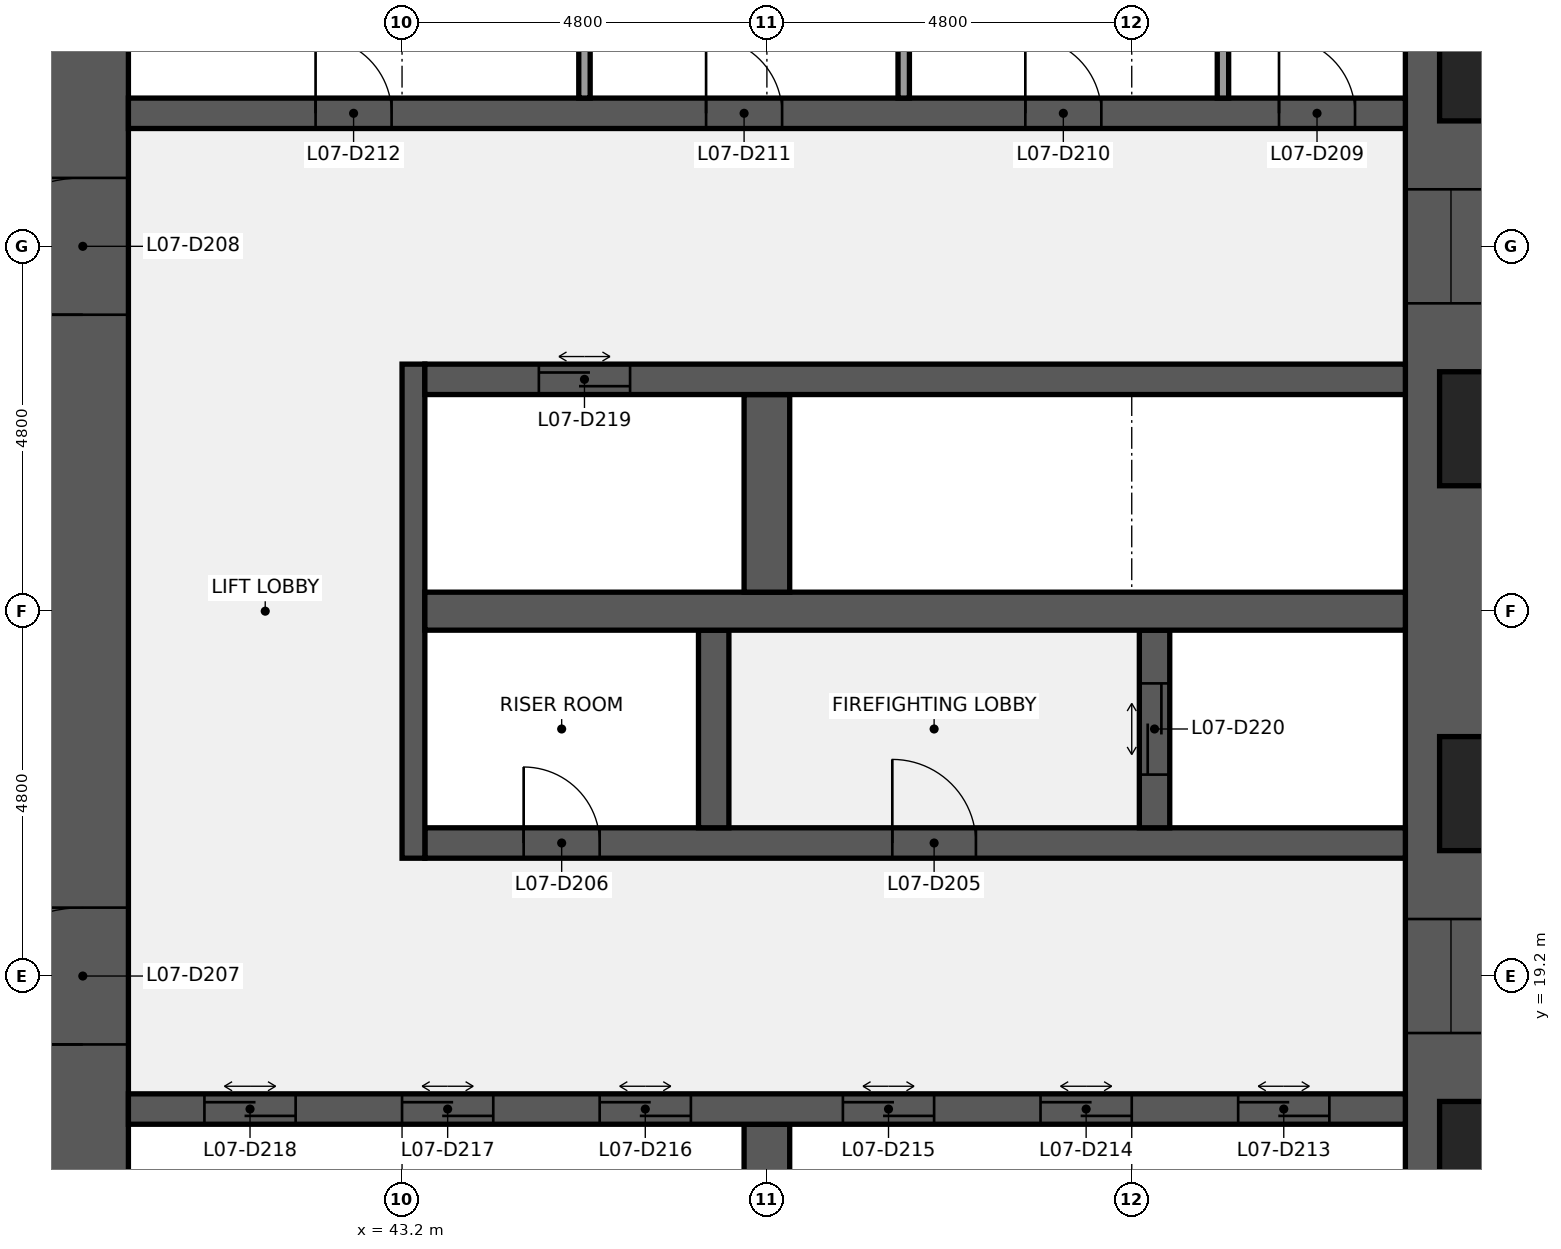
"""IFC4 building model, lengths in metres.
Left out: names, types, materials, properties, quantities, classifications, styles, units other than length and angle.
Written with IfcOpenShell. Run it as: python <this file> out.ifc"""

import sys

from ifc_helpers import new_model, si_unit, direction, frame, frame_2d, origin, place, context, subcontext, project, spatial, rectangle, extrude, element, fill, save


model = new_model("IFC4")
c1 = context("Model", 3, precision=1e-05, world=origin(), true_north=direction((0.0, 1.0)))
c2 = subcontext(c1, "Body", "Model", "MODEL_VIEW")
j1 = project(units=[si_unit("LENGTHUNIT", "METRE"), si_unit("PLANEANGLEUNIT", "RADIAN")], contexts=[c1])
p1 = place(None, origin())
s1 = spatial("IfcSite", under=j1, at=p1, CompositionType="ELEMENT")
p2 = place(p1, origin())
s2 = spatial("IfcBuilding", under=s1, at=p2, CompositionType="ELEMENT")
p3 = place(p2, frame((0.0, 0.0, 39.0)))
s3 = spatial("IfcBuildingStorey", under=s2, at=p3, CompositionType="ELEMENT", Elevation=39.0)
p4 = place(p3, frame((57.0, 38.4, 0.0), z_axis=(0.0, 0.0, 1.0), x_axis=(0.0, -1.0, 0.0)))
e1 = element("IfcWall", 1, at=p4, inside=s3, PredefinedType="SHEAR", context=c2, shape_type="SweptSolid", body=[
    extrude(rectangle(XDim=28.8, YDim=1.2, at=frame_2d((14.4, 0.0))), origin(), (0.0, 0.0, 1.0), 3.84),
])
p5 = place(p4, frame((18.45, 0.0, 0.9)))
e2 = element("IfcOpeningElement", 2, at=p5, cuts=e1, PredefinedType="OPENING", context=c2, shape_type="SweptSolid", body=[
    extrude(rectangle(XDim=1.5, YDim=1.5, at=frame_2d((0.75, 0.75))), frame((0.0, 0.61, 0.0), z_axis=(0.0, -1.0, 0.0), x_axis=(1.0, 0.0, 0.0)), (0.0, 0.0, 1.0), 1.22),
])
p6 = place(p4, frame((8.85, 0.0, 0.9)))
e3 = element("IfcOpeningElement", 3, at=p6, cuts=e1, PredefinedType="OPENING", context=c2, shape_type="SweptSolid", body=[
    extrude(rectangle(XDim=1.5, YDim=1.5, at=frame_2d((0.75, 0.75))), frame((0.0, 0.61, 0.0), z_axis=(0.0, -1.0, 0.0), x_axis=(1.0, 0.0, 0.0)), (0.0, 0.0, 1.0), 1.22),
])
p7 = place(p3, frame((39.0, 9.6, 0.0), z_axis=(0.0, 0.0, 1.0), x_axis=(0.0, 1.0, 0.0)))
e4 = element("IfcWall", 4, at=p7, inside=s3, PredefinedType="SHEAR", context=c2, shape_type="SweptSolid", body=[
    extrude(rectangle(XDim=28.8, YDim=1.2, at=frame_2d((14.4, 0.0))), origin(), (0.0, 0.0, 1.0), 3.84),
])
p8 = place(p7, frame((8.7, 0.0, 0.0)))
e5 = element("IfcOpeningElement", 5, at=p8, cuts=e4, PredefinedType="OPENING", context=c2, shape_type="SweptSolid", body=[
    extrude(rectangle(XDim=1.8, YDim=2.1, at=frame_2d((0.9, 1.05))), frame((0.0, 0.61, 0.0), z_axis=(0.0, -1.0, 0.0), x_axis=(1.0, 0.0, 0.0)), (0.0, 0.0, 1.0), 1.22),
])
p9 = place(p7, frame((18.3, 0.0, 0.0)))
e6 = element("IfcOpeningElement", 6, at=p9, cuts=e4, PredefinedType="OPENING", context=c2, shape_type="SweptSolid", body=[
    extrude(rectangle(XDim=1.8, YDim=2.1, at=frame_2d((0.9, 1.05))), frame((0.0, 0.61, 0.0), z_axis=(0.0, -1.0, 0.0), x_axis=(1.0, 0.0, 0.0)), (0.0, 0.0, 1.0), 1.22),
])
p10 = place(p3, frame((48.0, 14.65, 0.0), z_axis=(0.0, 0.0, 1.0), x_axis=(0.0, 1.0, 0.0)))
e7 = element("IfcWall", 7, at=p10, inside=s3, PredefinedType="SHEAR", context=c2, shape_type="SweptSolid", body=[
    extrude(rectangle(XDim=2.6, YDim=0.6, at=frame_2d((1.3, 0.0))), origin(), (0.0, 0.0, 1.0), 3.84),
])
p11 = place(p3, frame((39.6, 17.45, 0.0), z_axis=(0.0, 0.0, 1.0), x_axis=(1.0, 0.0, 0.0)))
e8 = element("IfcWall", 8, at=p11, inside=s3, PredefinedType="SHEAR", context=c2, shape_type="SweptSolid", body=[
    extrude(rectangle(XDim=16.8, YDim=0.4, at=frame_2d((8.4, 0.0))), origin(), (0.0, 0.0, 1.0), 3.84),
])
p12 = place(p11, frame((14.6, 0.0, 0.0)))
e9 = element("IfcOpeningElement", 9, at=p12, cuts=e8, PredefinedType="OPENING", context=c2, shape_type="SweptSolid", body=[
    extrude(rectangle(XDim=1.2, YDim=2.1, at=frame_2d((0.6, 1.05))), frame((0.0, 0.21, 0.0), z_axis=(0.0, -1.0, 0.0), x_axis=(1.0, 0.0, 0.0)), (0.0, 0.0, 1.0), 0.42),
])
p13 = place(p11, frame((12.0, 0.0, 0.0)))
e10 = element("IfcOpeningElement", 10, at=p13, cuts=e8, PredefinedType="OPENING", context=c2, shape_type="SweptSolid", body=[
    extrude(rectangle(XDim=1.2, YDim=2.1, at=frame_2d((0.6, 1.05))), frame((0.0, 0.21, 0.0), z_axis=(0.0, -1.0, 0.0), x_axis=(1.0, 0.0, 0.0)), (0.0, 0.0, 1.0), 0.42),
])
p14 = place(p11, frame((9.4, 0.0, 0.0)))
e11 = element("IfcOpeningElement", 11, at=p14, cuts=e8, PredefinedType="OPENING", context=c2, shape_type="SweptSolid", body=[
    extrude(rectangle(XDim=1.2, YDim=2.1, at=frame_2d((0.6, 1.05))), frame((0.0, 0.21, 0.0), z_axis=(0.0, -1.0, 0.0), x_axis=(1.0, 0.0, 0.0)), (0.0, 0.0, 1.0), 0.42),
])
p15 = place(p11, frame((6.2, 0.0, 0.0)))
e12 = element("IfcOpeningElement", 12, at=p15, cuts=e8, PredefinedType="OPENING", context=c2, shape_type="SweptSolid", body=[
    extrude(rectangle(XDim=1.2, YDim=2.1, at=frame_2d((0.6, 1.05))), frame((0.0, 0.21, 0.0), z_axis=(0.0, -1.0, 0.0), x_axis=(1.0, 0.0, 0.0)), (0.0, 0.0, 1.0), 0.42),
])
p16 = place(p11, frame((3.6, 0.0, 0.0)))
e13 = element("IfcOpeningElement", 13, at=p16, cuts=e8, PredefinedType="OPENING", context=c2, shape_type="SweptSolid", body=[
    extrude(rectangle(XDim=1.2, YDim=2.1, at=frame_2d((0.6, 1.05))), frame((0.0, 0.21, 0.0), z_axis=(0.0, -1.0, 0.0), x_axis=(1.0, 0.0, 0.0)), (0.0, 0.0, 1.0), 0.42),
])
p17 = place(p11, frame((1.0, 0.0, 0.0)))
e14 = element("IfcOpeningElement", 14, at=p17, cuts=e8, PredefinedType="OPENING", context=c2, shape_type="SweptSolid", body=[
    extrude(rectangle(XDim=1.2, YDim=2.1, at=frame_2d((0.6, 1.05))), frame((0.0, 0.21, 0.0), z_axis=(0.0, -1.0, 0.0), x_axis=(1.0, 0.0, 0.0)), (0.0, 0.0, 1.0), 0.42),
])
p18 = place(p3, frame((43.5, 20.95, 0.0), z_axis=(0.0, 0.0, 1.0), x_axis=(1.0, 0.0, 0.0)))
e15 = element("IfcWall", 15, at=p18, inside=s3, PredefinedType="SHEAR", context=c2, shape_type="SweptSolid", body=[
    extrude(rectangle(XDim=12.9, YDim=0.4, at=frame_2d((6.45, 0.0))), origin(), (0.0, 0.0, 1.0), 3.84),
])
p19 = place(p18, frame((6.15, 0.0, 0.0)))
e16 = element("IfcOpeningElement", 16, at=p19, cuts=e15, PredefinedType="OPENING", context=c2, shape_type="SweptSolid", body=[
    extrude(rectangle(XDim=1.1, YDim=2.1, at=frame_2d((0.55, 1.05))), frame((0.0, 0.21, 0.0), z_axis=(0.0, -1.0, 0.0), x_axis=(1.0, 0.0, 0.0)), (0.0, 0.0, 1.0), 0.42),
])
p20 = place(p18, frame((1.3, 0.0, 0.0)))
e17 = element("IfcOpeningElement", 17, at=p20, cuts=e15, PredefinedType="OPENING", context=c2, shape_type="SweptSolid", body=[
    extrude(rectangle(XDim=1.0, YDim=2.1, at=frame_2d((0.5, 1.05))), frame((0.0, 0.21, 0.0), z_axis=(0.0, -1.0, 0.0), x_axis=(1.0, 0.0, 0.0)), (0.0, 0.0, 1.0), 0.42),
])
p21 = place(p3, frame((43.35, 20.75, 0.0), z_axis=(0.0, 0.0, 1.0), x_axis=(0.0, 1.0, 0.0)))
e18 = element("IfcWall", 18, at=p21, inside=s3, PredefinedType="SHEAR", context=c2, shape_type="SweptSolid", body=[
    extrude(rectangle(XDim=6.5, YDim=0.3, at=frame_2d((3.25, 0.0))), origin(), (0.0, 0.0, 1.0), 3.84),
])
p22 = place(p3, frame((53.1, 21.15, 0.0), z_axis=(0.0, 0.0, 1.0), x_axis=(0.0, 1.0, 0.0)))
e19 = element("IfcWall", 19, at=p22, inside=s3, PredefinedType="SHEAR", context=c2, shape_type="SweptSolid", body=[
    extrude(rectangle(XDim=2.6, YDim=0.4, at=frame_2d((1.3, 0.0))), origin(), (0.0, 0.0, 1.0), 3.84),
])
p23 = place(p22, frame((0.7, 0.0, 0.0)))
e20 = element("IfcOpeningElement", 20, at=p23, cuts=e19, PredefinedType="OPENING", context=c2, shape_type="SweptSolid", body=[
    extrude(rectangle(XDim=1.2, YDim=2.1, at=frame_2d((0.6, 1.05))), frame((0.0, 0.21, 0.0), z_axis=(0.0, -1.0, 0.0), x_axis=(1.0, 0.0, 0.0)), (0.0, 0.0, 1.0), 0.42),
])
p24 = place(p3, frame((47.3, 21.15, 0.0), z_axis=(0.0, 0.0, 1.0), x_axis=(0.0, 1.0, 0.0)))
e21 = element("IfcWall", 21, at=p24, inside=s3, PredefinedType="SHEAR", context=c2, shape_type="SweptSolid", body=[
    extrude(rectangle(XDim=2.6, YDim=0.4, at=frame_2d((1.3, 0.0))), origin(), (0.0, 0.0, 1.0), 3.84),
])
p25 = place(p3, frame((43.5, 24.0, 0.0), z_axis=(0.0, 0.0, 1.0), x_axis=(1.0, 0.0, 0.0)))
e22 = element("IfcWall", 22, at=p25, inside=s3, PredefinedType="SHEAR", context=c2, shape_type="SweptSolid", body=[
    extrude(rectangle(XDim=12.9, YDim=0.5, at=frame_2d((6.45, 0.0))), origin(), (0.0, 0.0, 1.0), 3.84),
])
p26 = place(p3, frame((48.0, 24.25, 0.0), z_axis=(0.0, 0.0, 1.0), x_axis=(0.0, 1.0, 0.0)))
e23 = element("IfcWall", 23, at=p26, inside=s3, PredefinedType="SHEAR", context=c2, shape_type="SweptSolid", body=[
    extrude(rectangle(XDim=2.6, YDim=0.6, at=frame_2d((1.3, 0.0))), origin(), (0.0, 0.0, 1.0), 3.84),
])
p27 = place(p3, frame((43.5, 27.05, 0.0), z_axis=(0.0, 0.0, 1.0), x_axis=(1.0, 0.0, 0.0)))
e24 = element("IfcWall", 24, at=p27, inside=s3, PredefinedType="SHEAR", context=c2, shape_type="SweptSolid", body=[
    extrude(rectangle(XDim=12.9, YDim=0.4, at=frame_2d((6.45, 0.0))), origin(), (0.0, 0.0, 1.0), 3.84),
])
p28 = place(p27, frame((1.5, 0.0, 0.0)))
e25 = element("IfcOpeningElement", 25, at=p28, cuts=e24, PredefinedType="OPENING", context=c2, shape_type="SweptSolid", body=[
    extrude(rectangle(XDim=1.2, YDim=2.1, at=frame_2d((0.6, 1.05))), frame((0.0, 0.21, 0.0), z_axis=(0.0, -1.0, 0.0), x_axis=(1.0, 0.0, 0.0)), (0.0, 0.0, 1.0), 0.42),
])
p29 = place(p3, frame((39.6, 30.55, 0.0), z_axis=(0.0, 0.0, 1.0), x_axis=(1.0, 0.0, 0.0)))
e26 = element("IfcWall", 26, at=p29, inside=s3, PredefinedType="SHEAR", context=c2, shape_type="SweptSolid", body=[
    extrude(rectangle(XDim=16.8, YDim=0.4, at=frame_2d((8.4, 0.0))), origin(), (0.0, 0.0, 1.0), 3.84),
])
p30 = place(p29, frame((15.137, 0.0, 0.0)))
e27 = element("IfcOpeningElement", 27, at=p30, cuts=e26, PredefinedType="OPENING", context=c2, shape_type="SweptSolid", body=[
    extrude(rectangle(XDim=1.0, YDim=2.1, at=frame_2d((0.5, 1.05))), frame((0.0, 0.21, 0.0), z_axis=(0.0, -1.0, 0.0), x_axis=(1.0, 0.0, 0.0)), (0.0, 0.0, 1.0), 0.42),
])
p31 = place(p29, frame((11.8, 0.0, 0.0)))
e28 = element("IfcOpeningElement", 28, at=p31, cuts=e26, PredefinedType="OPENING", context=c2, shape_type="SweptSolid", body=[
    extrude(rectangle(XDim=1.0, YDim=2.1, at=frame_2d((0.5, 1.05))), frame((0.0, 0.21, 0.0), z_axis=(0.0, -1.0, 0.0), x_axis=(1.0, 0.0, 0.0)), (0.0, 0.0, 1.0), 0.42),
])
p32 = place(p29, frame((7.6, 0.0, 0.0)))
e29 = element("IfcOpeningElement", 29, at=p32, cuts=e26, PredefinedType="OPENING", context=c2, shape_type="SweptSolid", body=[
    extrude(rectangle(XDim=1.0, YDim=2.1, at=frame_2d((0.5, 1.05))), frame((0.0, 0.21, 0.0), z_axis=(0.0, -1.0, 0.0), x_axis=(1.0, 0.0, 0.0)), (0.0, 0.0, 1.0), 0.42),
])
p33 = place(p29, frame((2.462, 0.0, 0.0)))
e30 = element("IfcOpeningElement", 30, at=p33, cuts=e26, PredefinedType="OPENING", context=c2, shape_type="SweptSolid", body=[
    extrude(rectangle(XDim=1.0, YDim=2.1, at=frame_2d((0.5, 1.05))), frame((0.0, 0.21, 0.0), z_axis=(0.0, -1.0, 0.0), x_axis=(1.0, 0.0, 0.0)), (0.0, 0.0, 1.0), 0.42),
])
for number, where, z_axis, x_axis in (
    (31, (54.0, 30.75, 0.0), (0.0, 0.0, 1.0), (0.0, 1.0, 0.0)),
    (32, (49.8, 30.75, 0.0), (0.0, 0.0, 1.0), (0.0, 1.0, 0.0)),
    (33, (45.6, 30.75, 0.0), (0.0, 0.0, 1.0), (0.0, 1.0, 0.0)),
):
    element("IfcWall", number, at=place(p3, frame(where, z_axis=z_axis, x_axis=x_axis)), inside=s3, PredefinedType="PARTITIONING", context=c2, shape_type="SweptSolid", body=[
        extrude(rectangle(XDim=2.6, YDim=0.15, at=frame_2d((1.3, 0.0))), origin(), (0.0, 0.0, 1.0), 3.84),
    ])
p34 = place(p19, origin())
e34 = element("IfcDoor", 34, at=p34, inside=s3, OperationType="SINGLE_SWING_LEFT", PredefinedType="DOOR", context=c2, shape_type="SweptSolid", body=[
    extrude(rectangle(XDim=1.1, YDim=2.1, at=frame_2d((0.55, 1.05))), frame((0.0, 0.025, 0.0), z_axis=(0.0, -1.0, 0.0), x_axis=(1.0, 0.0, 0.0)), (0.0, 0.0, 1.0), 0.05),
])
fill(e16, e34)
p35 = place(p20, origin())
e35 = element("IfcDoor", 35, at=p35, inside=s3, OperationType="SINGLE_SWING_LEFT", PredefinedType="DOOR", context=c2, shape_type="SweptSolid", body=[
    extrude(rectangle(XDim=1.0, YDim=2.1, at=frame_2d((0.5, 1.05))), frame((0.0, 0.025, 0.0), z_axis=(0.0, -1.0, 0.0), x_axis=(1.0, 0.0, 0.0)), (0.0, 0.0, 1.0), 0.05),
])
fill(e17, e35)
p36 = place(p8, origin())
e36 = element("IfcDoor", 36, at=p36, inside=s3, OperationType="DOUBLE_DOOR_SINGLE_SWING", PredefinedType="DOOR", context=c2, shape_type="SweptSolid", body=[
    extrude(rectangle(XDim=1.8, YDim=2.1, at=frame_2d((0.9, 1.05))), frame((0.0, 0.025, 0.0), z_axis=(0.0, -1.0, 0.0), x_axis=(1.0, 0.0, 0.0)), (0.0, 0.0, 1.0), 0.05),
])
fill(e5, e36)
p37 = place(p9, origin())
e37 = element("IfcDoor", 37, at=p37, inside=s3, OperationType="DOUBLE_DOOR_SINGLE_SWING", PredefinedType="DOOR", context=c2, shape_type="SweptSolid", body=[
    extrude(rectangle(XDim=1.8, YDim=2.1, at=frame_2d((0.9, 1.05))), frame((0.0, 0.025, 0.0), z_axis=(0.0, -1.0, 0.0), x_axis=(1.0, 0.0, 0.0)), (0.0, 0.0, 1.0), 0.05),
])
fill(e6, e37)
p38 = place(p30, origin())
e38 = element("IfcDoor", 38, at=p38, inside=s3, OperationType="SINGLE_SWING_LEFT", PredefinedType="DOOR", context=c2, shape_type="SweptSolid", body=[
    extrude(rectangle(XDim=1.0, YDim=2.1, at=frame_2d((0.5, 1.05))), frame((0.0, 0.025, 0.0), z_axis=(0.0, -1.0, 0.0), x_axis=(1.0, 0.0, 0.0)), (0.0, 0.0, 1.0), 0.05),
])
fill(e27, e38)
p39 = place(p31, origin())
e39 = element("IfcDoor", 39, at=p39, inside=s3, OperationType="SINGLE_SWING_LEFT", PredefinedType="DOOR", context=c2, shape_type="SweptSolid", body=[
    extrude(rectangle(XDim=1.0, YDim=2.1, at=frame_2d((0.5, 1.05))), frame((0.0, 0.025, 0.0), z_axis=(0.0, -1.0, 0.0), x_axis=(1.0, 0.0, 0.0)), (0.0, 0.0, 1.0), 0.05),
])
fill(e28, e39)
p40 = place(p32, origin())
e40 = element("IfcDoor", 40, at=p40, inside=s3, OperationType="SINGLE_SWING_LEFT", PredefinedType="DOOR", context=c2, shape_type="SweptSolid", body=[
    extrude(rectangle(XDim=1.0, YDim=2.1, at=frame_2d((0.5, 1.05))), frame((0.0, 0.025, 0.0), z_axis=(0.0, -1.0, 0.0), x_axis=(1.0, 0.0, 0.0)), (0.0, 0.0, 1.0), 0.05),
])
fill(e29, e40)
p41 = place(p33, origin())
e41 = element("IfcDoor", 41, at=p41, inside=s3, OperationType="SINGLE_SWING_LEFT", PredefinedType="DOOR", context=c2, shape_type="SweptSolid", body=[
    extrude(rectangle(XDim=1.0, YDim=2.1, at=frame_2d((0.5, 1.05))), frame((0.0, 0.025, 0.0), z_axis=(0.0, -1.0, 0.0), x_axis=(1.0, 0.0, 0.0)), (0.0, 0.0, 1.0), 0.05),
])
fill(e30, e41)
p42 = place(p12, origin())
e42 = element("IfcDoor", 42, at=p42, inside=s3, OperationType="DOUBLE_DOOR_SLIDING", PredefinedType="DOOR", context=c2, shape_type="SweptSolid", body=[
    extrude(rectangle(XDim=1.2, YDim=2.1, at=frame_2d((0.6, 1.05))), frame((0.0, 0.025, 0.0), z_axis=(0.0, -1.0, 0.0), x_axis=(1.0, 0.0, 0.0)), (0.0, 0.0, 1.0), 0.05),
])
fill(e9, e42)
p43 = place(p13, origin())
e43 = element("IfcDoor", 43, at=p43, inside=s3, OperationType="DOUBLE_DOOR_SLIDING", PredefinedType="DOOR", context=c2, shape_type="SweptSolid", body=[
    extrude(rectangle(XDim=1.2, YDim=2.1, at=frame_2d((0.6, 1.05))), frame((0.0, 0.025, 0.0), z_axis=(0.0, -1.0, 0.0), x_axis=(1.0, 0.0, 0.0)), (0.0, 0.0, 1.0), 0.05),
])
fill(e10, e43)
p44 = place(p14, origin())
e44 = element("IfcDoor", 44, at=p44, inside=s3, OperationType="DOUBLE_DOOR_SLIDING", PredefinedType="DOOR", context=c2, shape_type="SweptSolid", body=[
    extrude(rectangle(XDim=1.2, YDim=2.1, at=frame_2d((0.6, 1.05))), frame((0.0, 0.025, 0.0), z_axis=(0.0, -1.0, 0.0), x_axis=(1.0, 0.0, 0.0)), (0.0, 0.0, 1.0), 0.05),
])
fill(e11, e44)
p45 = place(p15, origin())
e45 = element("IfcDoor", 45, at=p45, inside=s3, OperationType="DOUBLE_DOOR_SLIDING", PredefinedType="DOOR", context=c2, shape_type="SweptSolid", body=[
    extrude(rectangle(XDim=1.2, YDim=2.1, at=frame_2d((0.6, 1.05))), frame((0.0, 0.025, 0.0), z_axis=(0.0, -1.0, 0.0), x_axis=(1.0, 0.0, 0.0)), (0.0, 0.0, 1.0), 0.05),
])
fill(e12, e45)
p46 = place(p16, origin())
e46 = element("IfcDoor", 46, at=p46, inside=s3, OperationType="DOUBLE_DOOR_SLIDING", PredefinedType="DOOR", context=c2, shape_type="SweptSolid", body=[
    extrude(rectangle(XDim=1.2, YDim=2.1, at=frame_2d((0.6, 1.05))), frame((0.0, 0.025, 0.0), z_axis=(0.0, -1.0, 0.0), x_axis=(1.0, 0.0, 0.0)), (0.0, 0.0, 1.0), 0.05),
])
fill(e13, e46)
p47 = place(p17, origin())
e47 = element("IfcDoor", 47, at=p47, inside=s3, OperationType="DOUBLE_DOOR_SLIDING", PredefinedType="DOOR", context=c2, shape_type="SweptSolid", body=[
    extrude(rectangle(XDim=1.2, YDim=2.1, at=frame_2d((0.6, 1.05))), frame((0.0, 0.025, 0.0), z_axis=(0.0, -1.0, 0.0), x_axis=(1.0, 0.0, 0.0)), (0.0, 0.0, 1.0), 0.05),
])
fill(e14, e47)
p48 = place(p28, origin())
e48 = element("IfcDoor", 48, at=p48, inside=s3, OperationType="DOUBLE_DOOR_SLIDING", PredefinedType="DOOR", context=c2, shape_type="SweptSolid", body=[
    extrude(rectangle(XDim=1.2, YDim=2.1, at=frame_2d((0.6, 1.05))), frame((0.0, 0.025, 0.0), z_axis=(0.0, -1.0, 0.0), x_axis=(1.0, 0.0, 0.0)), (0.0, 0.0, 1.0), 0.05),
])
fill(e25, e48)
p49 = place(p23, origin())
e49 = element("IfcDoor", 49, at=p49, inside=s3, OperationType="DOUBLE_DOOR_SLIDING", PredefinedType="DOOR", context=c2, shape_type="SweptSolid", body=[
    extrude(rectangle(XDim=1.2, YDim=2.1, at=frame_2d((0.6, 1.05))), frame((0.0, 0.025, 0.0), z_axis=(0.0, -1.0, 0.0), x_axis=(1.0, 0.0, 0.0)), (0.0, 0.0, 1.0), 0.05),
])
fill(e20, e49)
p50 = place(p5, origin())
e50 = element("IfcWindow", 50, at=p50, inside=s3, PartitioningType="SINGLE_PANEL", PredefinedType="WINDOW", context=c2, shape_type="SweptSolid", body=[
    extrude(rectangle(XDim=1.5, YDim=1.5, at=frame_2d((0.75, 0.75))), frame((0.0, 0.03, 0.0), z_axis=(0.0, -1.0, 0.0), x_axis=(1.0, 0.0, 0.0)), (0.0, 0.0, 1.0), 0.06),
])
fill(e2, e50)
p51 = place(p6, origin())
e51 = element("IfcWindow", 51, at=p51, inside=s3, PartitioningType="SINGLE_PANEL", PredefinedType="WINDOW", context=c2, shape_type="SweptSolid", body=[
    extrude(rectangle(XDim=1.5, YDim=1.5, at=frame_2d((0.75, 0.75))), frame((0.0, 0.03, 0.0), z_axis=(0.0, -1.0, 0.0), x_axis=(1.0, 0.0, 0.0)), (0.0, 0.0, 1.0), 0.06),
])
fill(e3, e51)
save(model, sys.argv[1])
